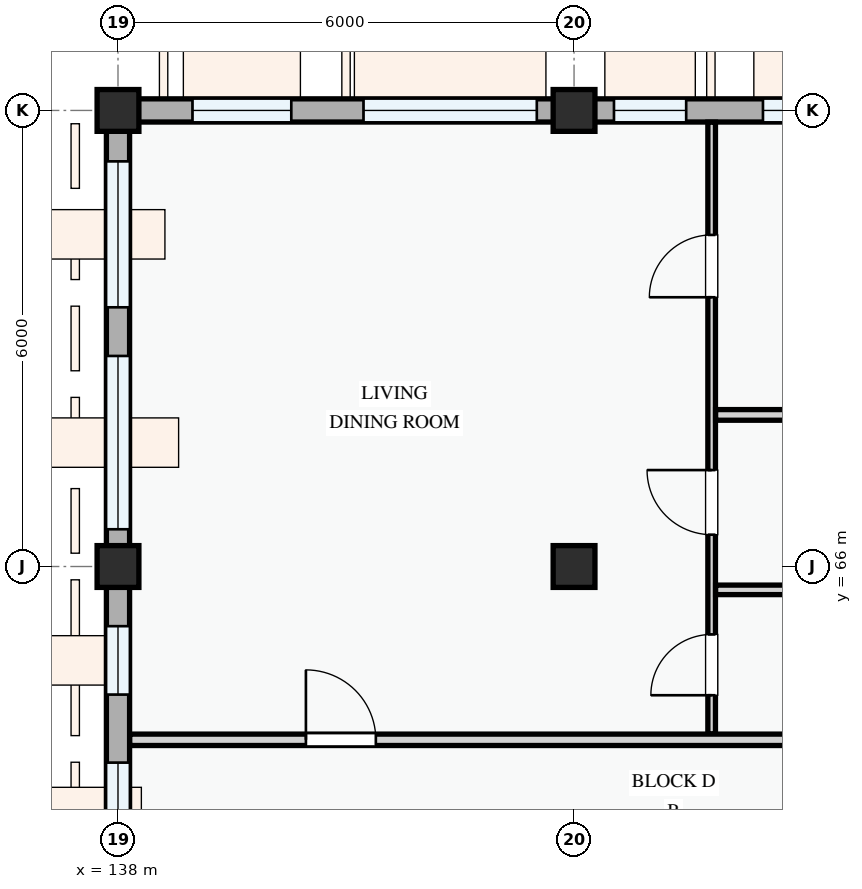
"""IFC4 building model, lengths in metres.
Left out: names, types, materials, properties, quantities, classifications, styles, units other than length and angle.
Written with IfcOpenShell. Run it as: python <this file> out.ifc"""

import sys

from ifc_helpers import new_model, si_unit, direction, frame, frame_2d, origin, origin_2d, place, context, subcontext, project, spatial, rectangle, extrude, element, fill, save


model = new_model("IFC4")
c1 = context("Model", 3, precision=1e-05, world=origin(), true_north=direction((0.0, 1.0)))
c2 = subcontext(c1, "Body", "Model", "MODEL_VIEW")
j1 = project(units=[si_unit("LENGTHUNIT", "METRE"), si_unit("PLANEANGLEUNIT", "RADIAN")], contexts=[c1])
p1 = place(None, origin())
s1 = spatial("IfcSite", under=j1, at=p1, CompositionType="ELEMENT")
p2 = place(p1, origin())
s2 = spatial("IfcBuilding", under=s1, at=p2, CompositionType="ELEMENT")
p3 = place(p2, frame((0.0, 0.0, 14.7)))
s3 = spatial("IfcBuildingStorey", under=s2, at=p3, CompositionType="ELEMENT", Elevation=14.7)
for number, where, z_axis, x_axis in (
    (1, (138.0, 66.0, 0.0), (0.0, 0.0, 1.0), (1.0, 0.0, 0.0)),
    (2, (138.0, 72.0, 0.0), (0.0, 0.0, 1.0), (1.0, 0.0, 0.0)),
    (3, (144.0, 66.0, 0.0), (0.0, 0.0, 1.0), (1.0, 0.0, 0.0)),
    (4, (144.0, 72.0, 0.0), (0.0, 0.0, 1.0), (1.0, 0.0, 0.0)),
):
    element("IfcColumn", number, at=place(p3, frame(where, z_axis=z_axis, x_axis=x_axis)), inside=s3, PredefinedType="COLUMN", context=c2, shape_type="SweptSolid", body=[
        extrude(rectangle(XDim=0.55, YDim=0.55, at=origin_2d()), origin(), (0.0, 0.0, 1.0), 3.3),
    ])
p4 = place(p3, frame((152.4, 72.0, 0.0), z_axis=(0.0, 0.0, 1.0), x_axis=(-1.0, 0.0, 0.0)))
e5 = element("IfcWall", 5, at=p4, inside=s3, PredefinedType="STANDARD", context=c2, shape_type="SweptSolid", body=[
    extrude(rectangle(XDim=8.4, YDim=0.305, at=frame_2d((4.2, 0.0))), origin(), (0.0, 0.0, 1.0), 2.375),
])
p5 = place(p4, frame((1.115, 0.0, 0.78)))
e6 = element("IfcOpeningElement", 6, at=p5, cuts=e5, PredefinedType="OPENING", context=c2, shape_type="SweptSolid", body=[
    extrude(rectangle(XDim=1.42, YDim=1.38, at=frame_2d((0.71, 0.69))), frame((0.0, 0.163, 0.0), z_axis=(0.0, -1.0, 0.0), x_axis=(1.0, 0.0, 0.0)), (0.0, 0.0, 1.0), 0.325),
])
p6 = place(p4, frame((3.995, 0.0, 0.78)))
e7 = element("IfcOpeningElement", 7, at=p6, cuts=e5, PredefinedType="OPENING", context=c2, shape_type="SweptSolid", body=[
    extrude(rectangle(XDim=1.92, YDim=1.44, at=frame_2d((0.96, 0.72))), frame((0.0, 0.163, 0.0), z_axis=(0.0, -1.0, 0.0), x_axis=(1.0, 0.0, 0.0)), (0.0, 0.0, 1.0), 0.325),
])
p7 = place(p4, frame((6.925, 0.0, 0.78)))
e8 = element("IfcOpeningElement", 8, at=p7, cuts=e5, PredefinedType="OPENING", context=c2, shape_type="SweptSolid", body=[
    extrude(rectangle(XDim=0.95, YDim=1.15, at=frame_2d((0.475, 0.575))), frame((0.0, 0.163, 0.0), z_axis=(0.0, -1.0, 0.0), x_axis=(1.0, 0.0, 0.0)), (0.0, 0.0, 1.0), 0.325),
])
p8 = place(p3, frame((144.0, 72.0, 0.0), z_axis=(0.0, 0.0, 1.0), x_axis=(-1.0, 0.0, 0.0)))
e9 = element("IfcWall", 9, at=p8, inside=s3, PredefinedType="STANDARD", context=c2, shape_type="SweptSolid", body=[
    extrude(rectangle(XDim=6.0, YDim=0.305, at=frame_2d((3.0, 0.0))), origin(), (0.0, 0.0, 1.0), 2.475),
])
p9 = place(p8, frame((0.49, 0.0, 0.78)))
e10 = element("IfcOpeningElement", 10, at=p9, cuts=e9, PredefinedType="OPENING", context=c2, shape_type="SweptSolid", body=[
    extrude(rectangle(XDim=2.28, YDim=1.46, at=frame_2d((1.14, 0.73))), frame((0.0, 0.163, 0.0), z_axis=(0.0, -1.0, 0.0), x_axis=(1.0, 0.0, 0.0)), (0.0, 0.0, 1.0), 0.325),
])
p10 = place(p8, frame((3.72, 0.0, 0.78)))
e11 = element("IfcOpeningElement", 11, at=p10, cuts=e9, PredefinedType="OPENING", context=c2, shape_type="SweptSolid", body=[
    extrude(rectangle(XDim=1.3, YDim=1.4, at=frame_2d((0.65, 0.7))), frame((0.0, 0.163, 0.0), z_axis=(0.0, -1.0, 0.0), x_axis=(1.0, 0.0, 0.0)), (0.0, 0.0, 1.0), 0.325),
])
p11 = place(p3, frame((138.0, 72.0, 0.0), z_axis=(0.0, 0.0, 1.0), x_axis=(0.0, -1.0, 0.0)))
e12 = element("IfcWall", 12, at=p11, inside=s3, PredefinedType="STANDARD", context=c2, shape_type="SweptSolid", body=[
    extrude(rectangle(XDim=6.0, YDim=0.305, at=frame_2d((3.0, 0.0))), origin(), (0.0, 0.0, 1.0), 2.575),
])
p12 = place(p11, frame((0.67, 0.0, 0.78)))
e13 = element("IfcOpeningElement", 13, at=p12, cuts=e12, PredefinedType="OPENING", context=c2, shape_type="SweptSolid", body=[
    extrude(rectangle(XDim=1.92, YDim=1.44, at=frame_2d((0.96, 0.72))), frame((0.0, 0.163, 0.0), z_axis=(0.0, -1.0, 0.0), x_axis=(1.0, 0.0, 0.0)), (0.0, 0.0, 1.0), 0.325),
])
p13 = place(p11, frame((3.23, 0.0, 0.78)))
e14 = element("IfcOpeningElement", 14, at=p13, cuts=e12, PredefinedType="OPENING", context=c2, shape_type="SweptSolid", body=[
    extrude(rectangle(XDim=2.28, YDim=1.46, at=frame_2d((1.14, 0.73))), frame((0.0, 0.163, 0.0), z_axis=(0.0, -1.0, 0.0), x_axis=(1.0, 0.0, 0.0)), (0.0, 0.0, 1.0), 0.325),
])
p14 = place(p3, frame((138.0, 66.0, 0.0), z_axis=(0.0, 0.0, 1.0), x_axis=(0.0, -1.0, 0.0)))
e15 = element("IfcWall", 15, at=p14, inside=s3, PredefinedType="STANDARD", context=c2, shape_type="SweptSolid", body=[
    extrude(rectangle(XDim=8.4, YDim=0.305, at=frame_2d((4.2, 0.0))), origin(), (0.0, 0.0, 1.0), 2.425),
])
p15 = place(p14, frame((0.785, 0.0, 0.78)))
e16 = element("IfcOpeningElement", 16, at=p15, cuts=e15, PredefinedType="OPENING", context=c2, shape_type="SweptSolid", body=[
    extrude(rectangle(XDim=0.9, YDim=1.2, at=frame_2d((0.45, 0.6))), frame((0.0, 0.163, 0.0), z_axis=(0.0, -1.0, 0.0), x_axis=(1.0, 0.0, 0.0)), (0.0, 0.0, 1.0), 0.325),
])
p16 = place(p14, frame((2.58, 0.0, 0.78)))
e17 = element("IfcOpeningElement", 17, at=p16, cuts=e15, PredefinedType="OPENING", context=c2, shape_type="SweptSolid", body=[
    extrude(rectangle(XDim=1.3, YDim=1.4, at=frame_2d((0.65, 0.7))), frame((0.0, 0.163, 0.0), z_axis=(0.0, -1.0, 0.0), x_axis=(1.0, 0.0, 0.0)), (0.0, 0.0, 1.0), 0.325),
])
p17 = place(p14, frame((5.305, 0.0, 0.78)))
e18 = element("IfcOpeningElement", 18, at=p17, cuts=e15, PredefinedType="OPENING", context=c2, shape_type="SweptSolid", body=[
    extrude(rectangle(XDim=1.78, YDim=1.42, at=frame_2d((0.89, 0.71))), frame((0.0, 0.163, 0.0), z_axis=(0.0, -1.0, 0.0), x_axis=(1.0, 0.0, 0.0)), (0.0, 0.0, 1.0), 0.325),
])
p18 = place(p3, frame((145.81, 63.797, 0.0), z_axis=(0.0, 0.0, 1.0), x_axis=(0.0, 1.0, 0.0)))
e19 = element("IfcWall", 19, at=p18, inside=s3, PredefinedType="PARTITIONING", context=c2, shape_type="SweptSolid", body=[
    extrude(rectangle(XDim=8.048, YDim=0.1, at=frame_2d((4.024, 0.0))), origin(), (0.0, 0.0, 1.0), 3.0),
])
p19 = place(p18, frame((0.51, 0.0, 0.0)))
e20 = element("IfcOpeningElement", 20, at=p19, cuts=e19, PredefinedType="OPENING", context=c2, shape_type="SweptSolid", body=[
    extrude(rectangle(XDim=0.8, YDim=2.1, at=frame_2d((0.4, 1.05))), frame((0.0, 0.06, 0.0), z_axis=(0.0, -1.0, 0.0), x_axis=(1.0, 0.0, 0.0)), (0.0, 0.0, 1.0), 0.12),
])
p20 = place(p18, frame((2.622, 0.0, 0.0)))
e21 = element("IfcOpeningElement", 21, at=p20, cuts=e19, PredefinedType="OPENING", context=c2, shape_type="SweptSolid", body=[
    extrude(rectangle(XDim=0.85, YDim=2.1, at=frame_2d((0.425, 1.05))), frame((0.0, 0.06, 0.0), z_axis=(0.0, -1.0, 0.0), x_axis=(1.0, 0.0, 0.0)), (0.0, 0.0, 1.0), 0.12),
])
p21 = place(p18, frame((5.745, 0.0, 0.0)))
e22 = element("IfcOpeningElement", 22, at=p21, cuts=e19, PredefinedType="OPENING", context=c2, shape_type="SweptSolid", body=[
    extrude(rectangle(XDim=0.82, YDim=2.08, at=frame_2d((0.41, 1.04))), frame((0.0, 0.06, 0.0), z_axis=(0.0, -1.0, 0.0), x_axis=(1.0, 0.0, 0.0)), (0.0, 0.0, 1.0), 0.12),
])
p22 = place(p3, frame((145.862, 67.994, 0.0), z_axis=(0.0, 0.0, 1.0), x_axis=(1.0, 0.0, 0.0)))
e23 = element("IfcWall", 23, at=p22, inside=s3, PredefinedType="PARTITIONING", context=c2, shape_type="SweptSolid", body=[
    extrude(rectangle(XDim=6.566, YDim=0.14, at=frame_2d((3.283, 0.0))), origin(), (0.0, 0.0, 1.0), 3.0),
])
p23 = place(p3, frame((145.862, 65.693, 0.0), z_axis=(0.0, 0.0, 1.0), x_axis=(1.0, 0.0, 0.0)))
e24 = element("IfcWall", 24, at=p23, inside=s3, PredefinedType="PARTITIONING", context=c2, shape_type="SweptSolid", body=[
    extrude(rectangle(XDim=6.566, YDim=0.125, at=frame_2d((3.283, 0.0))), origin(), (0.0, 0.0, 1.0), 2.375),
])
p24 = place(p3, frame((138.155, 63.72, 0.0), z_axis=(0.0, 0.0, 1.0), x_axis=(1.0, 0.0, 0.0)))
e25 = element("IfcWall", 25, at=p24, inside=s3, PredefinedType="PARTITIONING", context=c2, shape_type="SweptSolid", body=[
    extrude(rectangle(XDim=14.385, YDim=0.15, at=frame_2d((7.193, 0.0))), origin(), (0.0, 0.0, 1.0), 3.0),
])
p25 = place(p24, frame((2.318, 0.0, 0.0)))
e26 = element("IfcOpeningElement", 26, at=p25, cuts=e25, PredefinedType="OPENING", context=c2, shape_type="SweptSolid", body=[
    extrude(rectangle(XDim=0.92, YDim=2.1, at=frame_2d((0.46, 1.05))), frame((0.0, 0.085, 0.0), z_axis=(0.0, -1.0, 0.0), x_axis=(1.0, 0.0, 0.0)), (0.0, 0.0, 1.0), 0.17),
])
p26 = place(p6, origin())
e27 = element("IfcWindow", 27, at=p26, inside=s3, PartitioningType="DOUBLE_PANEL_VERTICAL", PredefinedType="WINDOW", context=c2, shape_type="SweptSolid", body=[
    extrude(rectangle(XDim=1.92, YDim=1.44, at=frame_2d((0.96, 0.72))), frame((0.0, 0.03, 0.0), z_axis=(0.0, -1.0, 0.0), x_axis=(1.0, 0.0, 0.0)), (0.0, 0.0, 1.0), 0.06),
])
fill(e7, e27)
p27 = place(p7, origin())
e28 = element("IfcWindow", 28, at=p27, inside=s3, PartitioningType="SINGLE_PANEL", PredefinedType="WINDOW", context=c2, shape_type="SweptSolid", body=[
    extrude(rectangle(XDim=0.95, YDim=1.15, at=frame_2d((0.475, 0.575))), frame((0.0, 0.03, 0.0), z_axis=(0.0, -1.0, 0.0), x_axis=(1.0, 0.0, 0.0)), (0.0, 0.0, 1.0), 0.06),
])
fill(e8, e28)
p28 = place(p9, origin())
e29 = element("IfcWindow", 29, at=p28, inside=s3, PartitioningType="DOUBLE_PANEL_VERTICAL", PredefinedType="WINDOW", context=c2, shape_type="SweptSolid", body=[
    extrude(rectangle(XDim=2.28, YDim=1.46, at=frame_2d((1.14, 0.73))), frame((0.0, 0.03, 0.0), z_axis=(0.0, -1.0, 0.0), x_axis=(1.0, 0.0, 0.0)), (0.0, 0.0, 1.0), 0.06),
])
fill(e10, e29)
p29 = place(p10, origin())
e30 = element("IfcWindow", 30, at=p29, inside=s3, PartitioningType="SINGLE_PANEL", PredefinedType="WINDOW", context=c2, shape_type="SweptSolid", body=[
    extrude(rectangle(XDim=1.3, YDim=1.4, at=frame_2d((0.65, 0.7))), frame((0.0, 0.03, 0.0), z_axis=(0.0, -1.0, 0.0), x_axis=(1.0, 0.0, 0.0)), (0.0, 0.0, 1.0), 0.06),
])
fill(e11, e30)
p30 = place(p12, origin())
e31 = element("IfcWindow", 31, at=p30, inside=s3, PartitioningType="DOUBLE_PANEL_VERTICAL", PredefinedType="WINDOW", context=c2, shape_type="SweptSolid", body=[
    extrude(rectangle(XDim=1.92, YDim=1.44, at=frame_2d((0.96, 0.72))), frame((0.0, 0.03, 0.0), z_axis=(0.0, -1.0, 0.0), x_axis=(1.0, 0.0, 0.0)), (0.0, 0.0, 1.0), 0.06),
])
fill(e13, e31)
p31 = place(p13, origin())
e32 = element("IfcWindow", 32, at=p31, inside=s3, PartitioningType="DOUBLE_PANEL_VERTICAL", PredefinedType="WINDOW", context=c2, shape_type="SweptSolid", body=[
    extrude(rectangle(XDim=2.28, YDim=1.46, at=frame_2d((1.14, 0.73))), frame((0.0, 0.03, 0.0), z_axis=(0.0, -1.0, 0.0), x_axis=(1.0, 0.0, 0.0)), (0.0, 0.0, 1.0), 0.06),
])
fill(e14, e32)
p32 = place(p15, origin())
e33 = element("IfcWindow", 33, at=p32, inside=s3, PartitioningType="SINGLE_PANEL", PredefinedType="WINDOW", context=c2, shape_type="SweptSolid", body=[
    extrude(rectangle(XDim=0.9, YDim=1.2, at=frame_2d((0.45, 0.6))), frame((0.0, 0.03, 0.0), z_axis=(0.0, -1.0, 0.0), x_axis=(1.0, 0.0, 0.0)), (0.0, 0.0, 1.0), 0.06),
])
fill(e16, e33)
p33 = place(p16, origin())
e34 = element("IfcWindow", 34, at=p33, inside=s3, PartitioningType="SINGLE_PANEL", PredefinedType="WINDOW", context=c2, shape_type="SweptSolid", body=[
    extrude(rectangle(XDim=1.3, YDim=1.4, at=frame_2d((0.65, 0.7))), frame((0.0, 0.03, 0.0), z_axis=(0.0, -1.0, 0.0), x_axis=(1.0, 0.0, 0.0)), (0.0, 0.0, 1.0), 0.06),
])
fill(e17, e34)
p34 = place(p19, origin())
e35 = element("IfcDoor", 35, at=p34, inside=s3, OperationType="SINGLE_SWING_LEFT", PredefinedType="DOOR", context=c2, shape_type="SweptSolid", body=[
    extrude(rectangle(XDim=0.8, YDim=2.1, at=frame_2d((0.4, 1.05))), frame((0.0, 0.025, 0.0), z_axis=(0.0, -1.0, 0.0), x_axis=(1.0, 0.0, 0.0)), (0.0, 0.0, 1.0), 0.05),
])
fill(e20, e35)
p35 = place(p20, origin())
e36 = element("IfcDoor", 36, at=p35, inside=s3, OperationType="SINGLE_SWING_RIGHT", PredefinedType="DOOR", context=c2, shape_type="SweptSolid", body=[
    extrude(rectangle(XDim=0.85, YDim=2.1, at=frame_2d((0.425, 1.05))), frame((0.0, 0.025, 0.0), z_axis=(0.0, -1.0, 0.0), x_axis=(1.0, 0.0, 0.0)), (0.0, 0.0, 1.0), 0.05),
])
fill(e21, e36)
p36 = place(p21, origin())
e37 = element("IfcDoor", 37, at=p36, inside=s3, OperationType="SINGLE_SWING_LEFT", PredefinedType="DOOR", context=c2, shape_type="SweptSolid", body=[
    extrude(rectangle(XDim=0.82, YDim=2.08, at=frame_2d((0.41, 1.04))), frame((0.0, 0.025, 0.0), z_axis=(0.0, -1.0, 0.0), x_axis=(1.0, 0.0, 0.0)), (0.0, 0.0, 1.0), 0.05),
])
fill(e22, e37)
p37 = place(p25, origin())
e38 = element("IfcDoor", 38, at=p37, inside=s3, OperationType="SINGLE_SWING_LEFT", PredefinedType="DOOR", context=c2, shape_type="SweptSolid", body=[
    extrude(rectangle(XDim=0.92, YDim=2.1, at=frame_2d((0.46, 1.05))), frame((0.0, 0.025, 0.0), z_axis=(0.0, -1.0, 0.0), x_axis=(1.0, 0.0, 0.0)), (0.0, 0.0, 1.0), 0.05),
])
fill(e26, e38)
save(model, sys.argv[1])
